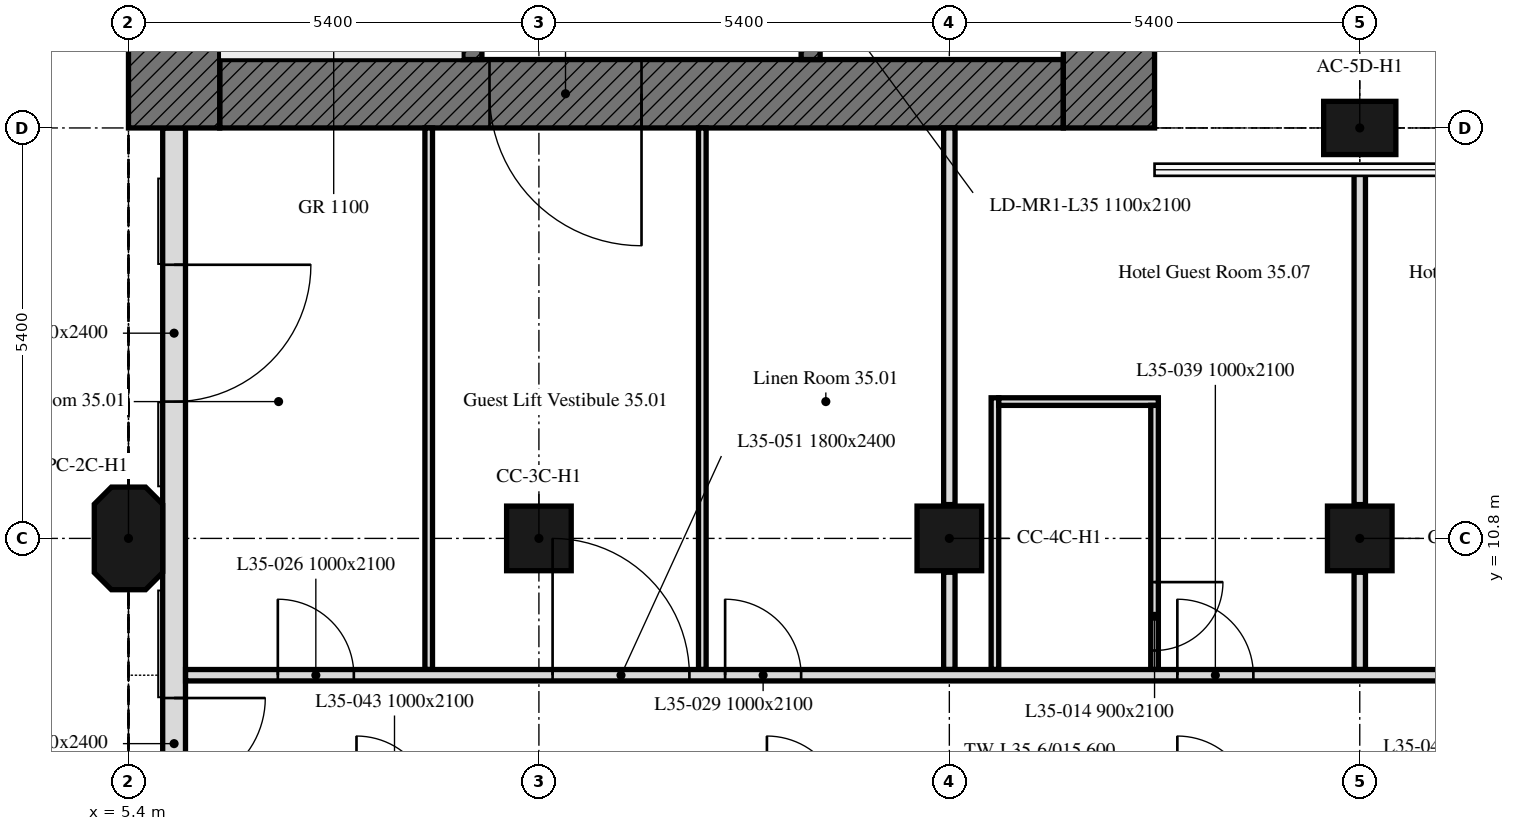
"""IFC4 building model, lengths in metres.
Left out: names, types, materials, properties, quantities, classifications, styles, units other than length and angle.
Written with IfcOpenShell. Run it as: python <this file> out.ifc"""

import sys

from ifc_helpers import new_model, si_unit, direction, frame, frame_2d, origin, origin_2d, place, context, subcontext, project, spatial, polyline, rectangle, outline, extrude, element, fill, save


model = new_model("IFC4")
c1 = context("Model", 3, precision=1e-05, world=origin(), true_north=direction((0.0, 1.0)))
c2 = subcontext(c1, "Body", "Model", "MODEL_VIEW")
j1 = project(units=[si_unit("LENGTHUNIT", "METRE"), si_unit("PLANEANGLEUNIT", "RADIAN")], contexts=[c1])
p1 = place(None, origin())
s1 = spatial("IfcSite", under=j1, at=p1, CompositionType="ELEMENT")
p2 = place(p1, origin())
s2 = spatial("IfcBuilding", under=s1, at=p2, CompositionType="ELEMENT")
p3 = place(p2, frame((0.0, 0.0, 152.8)))
s3 = spatial("IfcBuildingStorey", under=s2, at=p3, CompositionType="ELEMENT", Elevation=152.8)
p4 = place(p3, frame((5.4, 10.8, 0.0), z_axis=(0.0, 0.0, 1.0), x_axis=(0.0, 1.0, 0.0)))
e1 = element("IfcColumn", 1, at=p4, inside=s3, PredefinedType="COLUMN", context=c2, shape_type="SweptSolid", body=[
    extrude(outline(polyline([(-0.45, -0.45), (0.45, -0.45), (0.675, -0.225), (0.675, 0.225), (0.45, 0.45), (-0.45, 0.45), (-0.675, 0.225), (-0.675, -0.225), (-0.45, -0.45)])), origin(), (0.0, 0.0, 1.0), 3.0),
])
for number, where, z_axis, x_axis in (
    (2, (10.8, 10.8, 0.0), (0.0, 0.0, 1.0), (1.0, 0.0, 0.0)),
    (3, (16.2, 10.8, 0.0), (0.0, 0.0, 1.0), (1.0, 0.0, 0.0)),
    (4, (21.6, 10.8, 0.0), (0.0, 0.0, 1.0), (1.0, 0.0, 0.0)),
):
    element("IfcColumn", number, at=place(p3, frame(where, z_axis=z_axis, x_axis=x_axis)), inside=s3, PredefinedType="COLUMN", context=c2, shape_type="SweptSolid", body=[
        extrude(rectangle(XDim=0.85, YDim=0.85, at=origin_2d()), origin(), (0.0, 0.0, 1.0), 3.0),
    ])
p5 = place(p3, frame((21.6, 16.2, 0.0), z_axis=(0.0, 0.0, 1.0), x_axis=(1.0, 0.0, 0.0)))
e5 = element("IfcColumn", 5, at=p5, inside=s3, PredefinedType="COLUMN", context=c2, shape_type="SweptSolid", body=[
    extrude(rectangle(XDim=0.95, YDim=0.7, at=origin_2d()), origin(), (0.0, 0.0, 1.0), 3.0),
])
p6 = place(p3, frame((6.0, 16.2, 0.0), z_axis=(0.0, 0.0, 1.0), x_axis=(0.0, -1.0, 0.0)))
e6 = element("IfcWall", 6, at=p6, inside=s3, PredefinedType="SOLIDWALL", context=c2, shape_type="SweptSolid", body=[
    extrude(rectangle(XDim=10.614, YDim=0.3, at=frame_2d((5.307, 0.0))), origin(), (0.0, 0.0, 1.0), 3.0),
])
p7 = place(p6, frame((1.8, 0.0, 0.0)))
e7 = element("IfcOpeningElement", 7, at=p7, cuts=e6, PredefinedType="OPENING", context=c2, shape_type="SweptSolid", body=[
    extrude(rectangle(XDim=1.8, YDim=2.4, at=frame_2d((0.9, 1.2))), frame((0.0, 0.16, 0.0), z_axis=(0.0, -1.0, 0.0), x_axis=(1.0, 0.0, 0.0)), (0.0, 0.0, 1.0), 0.32),
])
p8 = place(p6, frame((7.5, 0.0, 0.0)))
e8 = element("IfcOpeningElement", 8, at=p8, cuts=e6, PredefinedType="OPENING", context=c2, shape_type="SweptSolid", body=[
    extrude(rectangle(XDim=1.2, YDim=2.4, at=frame_2d((0.6, 1.2))), frame((0.0, 0.16, 0.0), z_axis=(0.0, -1.0, 0.0), x_axis=(1.0, 0.0, 0.0)), (0.0, 0.0, 1.0), 0.32),
])
p9 = place(p3, frame((17.7, 16.65, 0.0), z_axis=(0.0, 0.0, 1.0), x_axis=(-1.0, 0.0, 0.0)))
e9 = element("IfcWall", 9, at=p9, inside=s3, PredefinedType="SOLIDWALL", context=c2, shape_type="SweptSolid", body=[
    extrude(rectangle(XDim=11.1, YDim=0.9, at=frame_2d((5.55, 0.0))), origin(), (0.0, 0.0, 1.0), 3.0),
])
p10 = place(p9, frame((5.55, 0.0, 0.0)))
e10 = element("IfcOpeningElement", 10, at=p10, cuts=e9, PredefinedType="OPENING", context=c2, shape_type="SweptSolid", body=[
    extrude(rectangle(XDim=2.0, YDim=2.4, at=frame_2d((1.0, 1.2))), frame((0.0, 0.45, 0.0), z_axis=(0.0, -1.0, 0.0), x_axis=(1.0, 0.0, 0.0)), (0.0, 0.0, 1.0), 0.9),
])
for number, where, z_axis, x_axis in (
    (11, (6.0, 16.2, 0.0), (0.0, 0.0, 1.0), (0.0, 1.0, 0.0)),
    (12, (18.3, 32.4, 0.0), (0.0, 0.0, 1.0), (0.0, -1.0, 0.0)),
):
    element("IfcWall", number, at=place(p3, frame(where, z_axis=z_axis, x_axis=x_axis)), inside=s3, PredefinedType="SOLIDWALL", context=c2, shape_type="SweptSolid", body=[
        extrude(rectangle(XDim=16.2, YDim=1.2, at=frame_2d((8.1, 0.0))), origin(), (0.0, 0.0, 1.0), 3.0),
    ])
p11 = place(p3, frame((9.925, 17.1, 0.0), z_axis=(0.0, 0.0, 1.0), x_axis=(0.0, 1.0, 0.0)))
e13 = element("IfcWall", 13, at=p11, inside=s3, PredefinedType="SOLIDWALL", context=c2, shape_type="SweptSolid", body=[
    extrude(rectangle(XDim=14.4, YDim=0.25, at=frame_2d((7.2, 0.0))), origin(), (0.0, 0.0, 1.0), 3.0),
])
p12 = place(p11, frame((4.6, 0.0, 0.0)))
e14 = element("IfcOpeningElement", 14, at=p12, cuts=e13, PredefinedType="OPENING", context=c2, shape_type="SweptSolid", body=[
    extrude(rectangle(XDim=1.0, YDim=2.1, at=frame_2d((0.5, 1.05))), frame((0.0, 0.125, 0.0), z_axis=(0.0, -1.0, 0.0), x_axis=(1.0, 0.0, 0.0)), (0.0, 0.0, 1.0), 0.25),
])
p13 = place(p11, frame((7.062, 0.0, 0.0)))
e15 = element("IfcOpeningElement", 15, at=p13, cuts=e13, PredefinedType="OPENING", context=c2, shape_type="SweptSolid", body=[
    extrude(rectangle(XDim=1.2, YDim=2.1, at=frame_2d((0.6, 1.05))), frame((0.0, 0.125, 0.0), z_axis=(0.0, -1.0, 0.0), x_axis=(1.0, 0.0, 0.0)), (0.0, 0.0, 1.0), 0.25),
])
p14 = place(p11, frame((9.472, 0.0, 0.0)))
e16 = element("IfcOpeningElement", 16, at=p14, cuts=e13, PredefinedType="OPENING", context=c2, shape_type="SweptSolid", body=[
    extrude(rectangle(XDim=0.9, YDim=2.1, at=frame_2d((0.45, 1.05))), frame((0.0, 0.125, 0.0), z_axis=(0.0, -1.0, 0.0), x_axis=(1.0, 0.0, 0.0)), (0.0, 0.0, 1.0), 0.25),
])
p15 = place(p11, frame((11.159, 0.0, 0.0)))
e17 = element("IfcOpeningElement", 17, at=p15, cuts=e13, PredefinedType="OPENING", context=c2, shape_type="SweptSolid", body=[
    extrude(rectangle(XDim=0.9, YDim=2.1, at=frame_2d((0.45, 1.05))), frame((0.0, 0.125, 0.0), z_axis=(0.0, -1.0, 0.0), x_axis=(1.0, 0.0, 0.0)), (0.0, 0.0, 1.0), 0.25),
])
p16 = place(p11, frame((13.1, 0.0, 0.0)))
e18 = element("IfcOpeningElement", 18, at=p16, cuts=e13, PredefinedType="OPENING", context=c2, shape_type="SweptSolid", body=[
    extrude(rectangle(XDim=0.9, YDim=2.1, at=frame_2d((0.45, 1.05))), frame((0.0, 0.125, 0.0), z_axis=(0.0, -1.0, 0.0), x_axis=(1.0, 0.0, 0.0)), (0.0, 0.0, 1.0), 0.25),
])
p17 = place(p3, frame((14.375, 17.1, 0.0), z_axis=(0.0, 0.0, 1.0), x_axis=(0.0, 1.0, 0.0)))
e19 = element("IfcWall", 19, at=p17, inside=s3, PredefinedType="SOLIDWALL", context=c2, shape_type="SweptSolid", body=[
    extrude(rectangle(XDim=14.4, YDim=0.25, at=frame_2d((7.2, 0.0))), origin(), (0.0, 0.0, 1.0), 3.0),
])
p18 = place(p17, frame((13.15, 0.0, 0.0)))
e20 = element("IfcOpeningElement", 20, at=p18, cuts=e19, PredefinedType="OPENING", context=c2, shape_type="SweptSolid", body=[
    extrude(rectangle(XDim=1.0, YDim=2.1, at=frame_2d((0.5, 1.05))), frame((0.0, 0.125, 0.0), z_axis=(0.0, -1.0, 0.0), x_axis=(1.0, 0.0, 0.0)), (0.0, 0.0, 1.0), 0.25),
])
p19 = place(p17, frame((0.6, 0.0, 0.0)))
e21 = element("IfcOpeningElement", 21, at=p19, cuts=e19, PredefinedType="OPENING", context=c2, shape_type="SweptSolid", body=[
    extrude(rectangle(XDim=1.1, YDim=2.1, at=frame_2d((0.55, 1.05))), frame((0.0, 0.125, 0.0), z_axis=(0.0, -1.0, 0.0), x_axis=(1.0, 0.0, 0.0)), (0.0, 0.0, 1.0), 0.25),
])
p20 = place(p17, frame((3.25, 0.0, 0.0)))
e22 = element("IfcOpeningElement", 22, at=p20, cuts=e19, PredefinedType="OPENING", context=c2, shape_type="SweptSolid", body=[
    extrude(rectangle(XDim=0.9, YDim=2.1, at=frame_2d((0.45, 1.05))), frame((0.0, 0.125, 0.0), z_axis=(0.0, -1.0, 0.0), x_axis=(1.0, 0.0, 0.0)), (0.0, 0.0, 1.0), 0.25),
])
p21 = place(p3, frame((16.2, 16.2, 0.0), z_axis=(0.0, 0.0, 1.0), x_axis=(0.0, -1.0, 0.0)))
e23 = element("IfcWall", 23, at=p21, inside=s3, PredefinedType="PARTITIONING", context=c2, shape_type="SweptSolid", body=[
    extrude(rectangle(XDim=4.955, YDim=0.15, at=frame_2d((2.478, 0.0))), origin(), (0.0, 0.0, 1.0), 2.4),
])
p22 = place(p3, frame((16.2, 10.355, 0.0), z_axis=(0.0, 0.0, 1.0), x_axis=(0.0, -1.0, 0.0)))
e24 = element("IfcWall", 24, at=p22, inside=s3, PredefinedType="PARTITIONING", context=c2, shape_type="SweptSolid", body=[
    extrude(rectangle(XDim=1.28, YDim=0.15, at=frame_2d((0.64, 0.0))), origin(), (0.0, 0.0, 1.0), 2.4),
])
p23 = place(p3, frame((16.8, 9.075, 0.0), z_axis=(0.0, 0.0, 1.0), x_axis=(0.0, 1.0, 0.0)))
e25 = element("IfcWall", 25, at=p23, inside=s3, PredefinedType="PARTITIONING", context=c2, shape_type="SweptSolid", body=[
    extrude(rectangle(XDim=3.575, YDim=0.1, at=frame_2d((1.788, 0.0))), origin(), (0.0, 0.0, 1.0), 3.0),
])
p24 = place(p3, frame((16.85, 12.6, 0.0), z_axis=(0.0, 0.0, 1.0), x_axis=(1.0, 0.0, 0.0)))
e26 = element("IfcWall", 26, at=p24, inside=s3, PredefinedType="PARTITIONING", context=c2, shape_type="SweptSolid", body=[
    extrude(rectangle(XDim=2.1, YDim=0.1, at=frame_2d((1.05, 0.0))), origin(), (0.0, 0.0, 1.0), 3.0),
])
p25 = place(p3, frame((18.9, 12.55, 0.0), z_axis=(0.0, 0.0, 1.0), x_axis=(0.0, -1.0, 0.0)))
e27 = element("IfcWall", 27, at=p25, inside=s3, PredefinedType="PARTITIONING", context=c2, shape_type="SweptSolid", body=[
    extrude(rectangle(XDim=3.475, YDim=0.1, at=frame_2d((1.738, 0.0))), origin(), (0.0, 0.0, 1.0), 3.0),
])
p26 = place(p25, frame((2.325, 0.0, 0.0)))
e28 = element("IfcOpeningElement", 28, at=p26, cuts=e27, PredefinedType="OPENING", context=c2, shape_type="SweptSolid", body=[
    extrude(rectangle(XDim=0.9, YDim=2.1, at=frame_2d((0.45, 1.05))), frame((0.0, 0.05, 0.0), z_axis=(0.0, -1.0, 0.0), x_axis=(1.0, 0.0, 0.0)), (0.0, 0.0, 1.0), 0.1),
])
p27 = place(p3, frame((21.6, 9.075, 0.0), z_axis=(0.0, 0.0, 1.0), x_axis=(0.0, 1.0, 0.0)))
e29 = element("IfcWall", 29, at=p27, inside=s3, PredefinedType="PARTITIONING", context=c2, shape_type="SweptSolid", body=[
    extrude(rectangle(XDim=1.28, YDim=0.15, at=frame_2d((0.64, 0.0))), origin(), (0.0, 0.0, 1.0), 2.4),
])
p28 = place(p3, frame((21.6, 11.245, 0.0), z_axis=(0.0, 0.0, 1.0), x_axis=(0.0, 1.0, 0.0)))
e30 = element("IfcWall", 30, at=p28, inside=s3, PredefinedType="PARTITIONING", context=c2, shape_type="SweptSolid", body=[
    extrude(rectangle(XDim=4.46, YDim=0.15, at=frame_2d((2.23, 0.0))), origin(), (0.0, 0.0, 1.0), 2.4),
])
for number, where, z_axis, x_axis in (
    (31, (9.35, 16.2, 0.0), (0.0, 0.0, 1.0), (0.0, -1.0, 0.0)),
    (32, (12.95, 9.075, 0.0), (0.0, 0.0, 1.0), (0.0, 1.0, 0.0)),
):
    element("IfcWall", number, at=place(p3, frame(where, z_axis=z_axis, x_axis=x_axis)), inside=s3, PredefinedType="PARTITIONING", context=c2, shape_type="SweptSolid", body=[
        extrude(rectangle(XDim=7.125, YDim=0.1, at=frame_2d((3.562, 0.0))), origin(), (0.0, 0.0, 1.0), 3.0),
    ])
p29 = place(p3, frame((6.151, 9.0, 0.0), z_axis=(0.0, 0.0, 1.0), x_axis=(1.0, 0.0, 0.0)))
e33 = element("IfcWall", 33, at=p29, inside=s3, PredefinedType="PARTITIONING", context=c2, shape_type="SweptSolid", body=[
    extrude(rectangle(XDim=36.974, YDim=0.15, at=frame_2d((18.487, 0.0))), origin(), (0.0, 0.0, 1.0), 2.4),
])
p30 = place(p29, frame((1.214, 0.0, 0.0)))
e34 = element("IfcOpeningElement", 34, at=p30, cuts=e33, PredefinedType="OPENING", context=c2, shape_type="SweptSolid", body=[
    extrude(rectangle(XDim=1.0, YDim=2.1, at=frame_2d((0.5, 1.05))), frame((0.0, 0.075, 0.0), z_axis=(0.0, -1.0, 0.0), x_axis=(1.0, 0.0, 0.0)), (0.0, 0.0, 1.0), 0.15),
])
p31 = place(p29, frame((28.199, 0.0, 0.0)))
e35 = element("IfcOpeningElement", 35, at=p31, cuts=e33, PredefinedType="OPENING", context=c2, shape_type="SweptSolid", body=[
    extrude(rectangle(XDim=1.0, YDim=2.1, at=frame_2d((0.5, 1.05))), frame((0.0, 0.075, 0.0), z_axis=(0.0, -1.0, 0.0), x_axis=(1.0, 0.0, 0.0)), (0.0, 0.0, 1.0), 0.15),
])
p32 = place(p29, frame((7.099, 0.0, 0.0)))
e36 = element("IfcOpeningElement", 36, at=p32, cuts=e33, PredefinedType="OPENING", context=c2, shape_type="SweptSolid", body=[
    extrude(rectangle(XDim=1.0, YDim=2.1, at=frame_2d((0.5, 1.05))), frame((0.0, 0.075, 0.0), z_axis=(0.0, -1.0, 0.0), x_axis=(1.0, 0.0, 0.0)), (0.0, 0.0, 1.0), 0.15),
])
p33 = place(p29, frame((13.049, 0.0, 0.0)))
e37 = element("IfcOpeningElement", 37, at=p33, cuts=e33, PredefinedType="OPENING", context=c2, shape_type="SweptSolid", body=[
    extrude(rectangle(XDim=1.0, YDim=2.1, at=frame_2d((0.5, 1.05))), frame((0.0, 0.075, 0.0), z_axis=(0.0, -1.0, 0.0), x_axis=(1.0, 0.0, 0.0)), (0.0, 0.0, 1.0), 0.15),
])
p34 = place(p29, frame((16.849, 0.0, 0.0)))
e38 = element("IfcOpeningElement", 38, at=p34, cuts=e33, PredefinedType="OPENING", context=c2, shape_type="SweptSolid", body=[
    extrude(rectangle(XDim=1.0, YDim=2.1, at=frame_2d((0.5, 1.05))), frame((0.0, 0.075, 0.0), z_axis=(0.0, -1.0, 0.0), x_axis=(1.0, 0.0, 0.0)), (0.0, 0.0, 1.0), 0.15),
])
p35 = place(p29, frame((23.849, 0.0, 0.0)))
e39 = element("IfcOpeningElement", 39, at=p35, cuts=e33, PredefinedType="OPENING", context=c2, shape_type="SweptSolid", body=[
    extrude(rectangle(XDim=1.0, YDim=2.1, at=frame_2d((0.5, 1.05))), frame((0.0, 0.075, 0.0), z_axis=(0.0, -1.0, 0.0), x_axis=(1.0, 0.0, 0.0)), (0.0, 0.0, 1.0), 0.15),
])
p36 = place(p29, frame((4.829, 0.0, 0.0)))
e40 = element("IfcOpeningElement", 40, at=p36, cuts=e33, PredefinedType="OPENING", context=c2, shape_type="SweptSolid", body=[
    extrude(rectangle(XDim=1.8, YDim=2.4, at=frame_2d((0.9, 1.2))), frame((0.0, 0.075, 0.0), z_axis=(0.0, -1.0, 0.0), x_axis=(1.0, 0.0, 0.0)), (0.0, 0.0, 1.0), 0.15),
])
p37 = place(p29, frame((30.199, 0.0, 0.0)))
e41 = element("IfcOpeningElement", 41, at=p37, cuts=e33, PredefinedType="OPENING", context=c2, shape_type="SweptSolid", body=[
    extrude(rectangle(XDim=1.0, YDim=2.1, at=frame_2d((0.5, 1.05))), frame((0.0, 0.075, 0.0), z_axis=(0.0, -1.0, 0.0), x_axis=(1.0, 0.0, 0.0)), (0.0, 0.0, 1.0), 0.15),
])
p38 = place(p7, origin())
e42 = element("IfcDoor", 42, at=p38, inside=s3, OperationType="DOUBLE_DOOR_DOUBLE_SWING", PredefinedType="DOOR", context=c2, shape_type="SweptSolid", body=[
    extrude(rectangle(XDim=1.8, YDim=2.4, at=frame_2d((0.9, 1.2))), frame((0.0, 0.025, 0.0), z_axis=(0.0, -1.0, 0.0), x_axis=(1.0, 0.0, 0.0)), (0.0, 0.0, 1.0), 0.05),
])
fill(e7, e42)
p39 = place(p8, origin())
e43 = element("IfcDoor", 43, at=p39, inside=s3, OperationType="SINGLE_SWING_LEFT", PredefinedType="DOOR", context=c2, shape_type="SweptSolid", body=[
    extrude(rectangle(XDim=1.2, YDim=2.4, at=frame_2d((0.6, 1.2))), frame((0.0, 0.025, 0.0), z_axis=(0.0, -1.0, 0.0), x_axis=(1.0, 0.0, 0.0)), (0.0, 0.0, 1.0), 0.05),
])
fill(e8, e43)
p40 = place(p10, origin())
e44 = element("IfcDoor", 44, at=p40, inside=s3, OperationType="DOUBLE_DOOR_SINGLE_SWING", PredefinedType="DOOR", context=c2, shape_type="SweptSolid", body=[
    extrude(rectangle(XDim=2.0, YDim=2.4, at=frame_2d((1.0, 1.2))), frame((0.0, 0.025, 0.0), z_axis=(0.0, -1.0, 0.0), x_axis=(1.0, 0.0, 0.0)), (0.0, 0.0, 1.0), 0.05),
])
fill(e10, e44)
p41 = place(p26, origin())
e45 = element("IfcDoor", 45, at=p41, inside=s3, OperationType="SINGLE_SWING_LEFT", PredefinedType="DOOR", context=c2, shape_type="SweptSolid", body=[
    extrude(rectangle(XDim=0.9, YDim=2.1, at=frame_2d((0.45, 1.05))), frame((0.0, 0.025, 0.0), z_axis=(0.0, -1.0, 0.0), x_axis=(1.0, 0.0, 0.0)), (0.0, 0.0, 1.0), 0.05),
])
fill(e28, e45)
p42 = place(p30, origin())
e46 = element("IfcDoor", 46, at=p42, inside=s3, OperationType="SINGLE_SWING_LEFT", PredefinedType="DOOR", context=c2, shape_type="SweptSolid", body=[
    extrude(rectangle(XDim=1.0, YDim=2.1, at=frame_2d((0.5, 1.05))), frame((0.0, 0.025, 0.0), z_axis=(0.0, -1.0, 0.0), x_axis=(1.0, 0.0, 0.0)), (0.0, 0.0, 1.0), 0.05),
])
fill(e34, e46)
p43 = place(p32, origin())
e47 = element("IfcDoor", 47, at=p43, inside=s3, OperationType="SINGLE_SWING_RIGHT", PredefinedType="DOOR", context=c2, shape_type="SweptSolid", body=[
    extrude(rectangle(XDim=1.0, YDim=2.1, at=frame_2d((0.5, 1.05))), frame((0.0, 0.025, 0.0), z_axis=(0.0, -1.0, 0.0), x_axis=(1.0, 0.0, 0.0)), (0.0, 0.0, 1.0), 0.05),
])
fill(e36, e47)
p44 = place(p33, origin())
e48 = element("IfcDoor", 48, at=p44, inside=s3, OperationType="SINGLE_SWING_RIGHT", PredefinedType="DOOR", context=c2, shape_type="SweptSolid", body=[
    extrude(rectangle(XDim=1.0, YDim=2.1, at=frame_2d((0.5, 1.05))), frame((0.0, 0.025, 0.0), z_axis=(0.0, -1.0, 0.0), x_axis=(1.0, 0.0, 0.0)), (0.0, 0.0, 1.0), 0.05),
])
fill(e37, e48)
p45 = place(p36, origin())
e49 = element("IfcDoor", 49, at=p45, inside=s3, OperationType="DOUBLE_DOOR_SINGLE_SWING", PredefinedType="DOOR", context=c2, shape_type="SweptSolid", body=[
    extrude(rectangle(XDim=1.8, YDim=2.4, at=frame_2d((0.9, 1.2))), frame((0.0, 0.025, 0.0), z_axis=(0.0, -1.0, 0.0), x_axis=(1.0, 0.0, 0.0)), (0.0, 0.0, 1.0), 0.05),
])
fill(e40, e49)
save(model, sys.argv[1])
